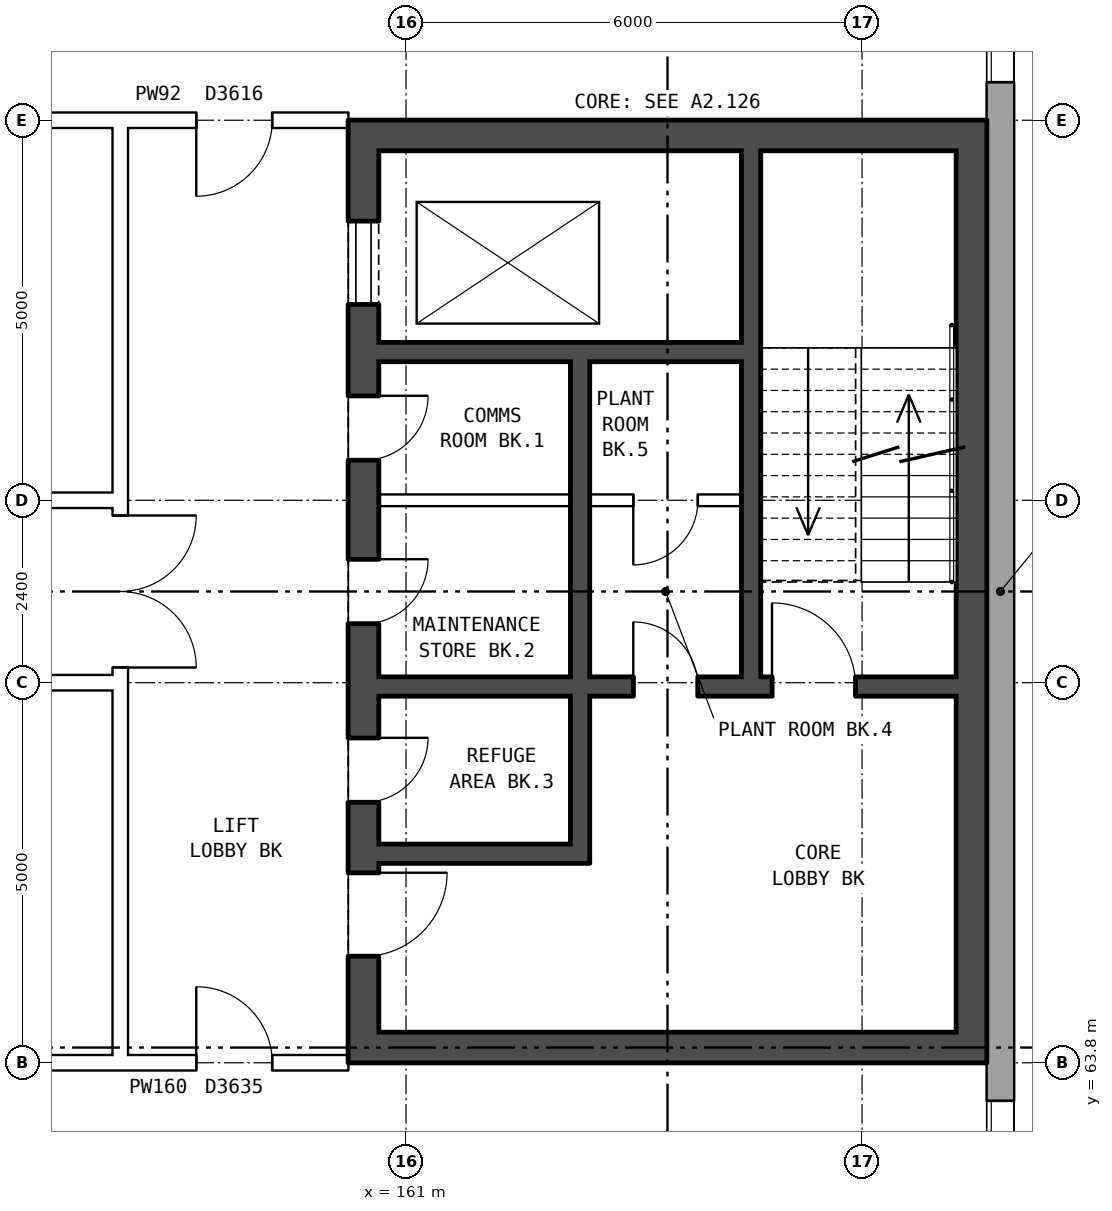
"""IFC4 building model, lengths in metres.
Left out: names, types, materials, properties, quantities, classifications, styles, units other than length and angle.
Written with IfcOpenShell. Run it as: python <this file> out.ifc"""

import sys

from ifc_helpers import new_model, si_unit, direction, frame, frame_2d, origin, place, context, subcontext, project, spatial, rectangle, extrude, element, fill, save


model = new_model("IFC4")
c1 = context("Model", 3, precision=1e-05, world=origin(), true_north=direction((0.0, 1.0)))
c2 = subcontext(c1, "Body", "Model", "MODEL_VIEW")
j1 = project(units=[si_unit("LENGTHUNIT", "METRE"), si_unit("PLANEANGLEUNIT", "RADIAN")], contexts=[c1])
p1 = place(None, origin())
s1 = spatial("IfcSite", under=j1, at=p1, CompositionType="ELEMENT")
p2 = place(p1, origin())
s2 = spatial("IfcBuilding", under=s1, at=p2, CompositionType="ELEMENT")
p3 = place(p2, frame((0.0, 0.0, 198.6)))
s3 = spatial("IfcBuildingStorey", under=s2, at=p3, CompositionType="ELEMENT", Elevation=198.6)
p4 = place(p3, frame((168.82, 57.075, 0.0), z_axis=(0.0, 0.0, 1.0), x_axis=(0.0, 1.0, 0.0)))
e1 = element("IfcWall", 1, at=p4, inside=s3, PredefinedType="STANDARD", context=c2, shape_type="SweptSolid", body=[
    extrude(rectangle(XDim=25.851, YDim=0.36, at=frame_2d((12.925, 0.0))), origin(), (0.0, 0.0, 1.0), 3.7),
])
p5 = place(p4, frame((1.625, 0.0, 1.5)))
e2 = element("IfcOpeningElement", 2, at=p5, cuts=e1, PredefinedType="OPENING", context=c2, shape_type="SweptSolid", body=[
    extrude(rectangle(XDim=1.6, YDim=1.2, at=frame_2d((0.8, 0.6))), frame((0.0, 0.19, 0.0), z_axis=(0.0, -1.0, 0.0), x_axis=(1.0, 0.0, 0.0)), (0.0, 0.0, 1.0), 0.38),
])
p6 = place(p4, frame((4.625, 0.0, 1.5)))
e3 = element("IfcOpeningElement", 3, at=p6, cuts=e1, PredefinedType="OPENING", context=c2, shape_type="SweptSolid", body=[
    extrude(rectangle(XDim=1.6, YDim=1.2, at=frame_2d((0.8, 0.6))), frame((0.0, 0.19, 0.0), z_axis=(0.0, -1.0, 0.0), x_axis=(1.0, 0.0, 0.0)), (0.0, 0.0, 1.0), 0.38),
])
p7 = place(p4, frame((19.625, 0.0, 1.5)))
e4 = element("IfcOpeningElement", 4, at=p7, cuts=e1, PredefinedType="OPENING", context=c2, shape_type="SweptSolid", body=[
    extrude(rectangle(XDim=1.6, YDim=1.2, at=frame_2d((0.8, 0.6))), frame((0.0, 0.19, 0.0), z_axis=(0.0, -1.0, 0.0), x_axis=(1.0, 0.0, 0.0)), (0.0, 0.0, 1.0), 0.38),
])
p8 = place(p4, frame((22.625, 0.0, 1.5)))
e5 = element("IfcOpeningElement", 5, at=p8, cuts=e1, PredefinedType="OPENING", context=c2, shape_type="SweptSolid", body=[
    extrude(rectangle(XDim=1.6, YDim=1.2, at=frame_2d((0.8, 0.6))), frame((0.0, 0.19, 0.0), z_axis=(0.0, -1.0, 0.0), x_axis=(1.0, 0.0, 0.0)), (0.0, 0.0, 1.0), 0.38),
])
p9 = place(p3, frame((160.44, 76.2, 0.0), z_axis=(0.0, 0.0, 1.0), x_axis=(0.0, -1.0, 0.0)))
e6 = element("IfcWall", 6, at=p9, inside=s3, PredefinedType="SHEAR", context=c2, shape_type="SweptSolid", body=[
    extrude(rectangle(XDim=12.4, YDim=0.4, at=frame_2d((6.2, 0.0))), origin(), (0.0, 0.0, 1.0), 3.7),
])
p10 = place(p9, frame((1.325, 0.0, 0.0)))
e7 = element("IfcOpeningElement", 7, at=p10, cuts=e6, PredefinedType="OPENING", context=c2, shape_type="SweptSolid", body=[
    extrude(rectangle(XDim=1.1, YDim=2.1, at=frame_2d((0.55, 1.05))), frame((0.0, 0.21, 0.0), z_axis=(0.0, -1.0, 0.0), x_axis=(1.0, 0.0, 0.0)), (0.0, 0.0, 1.0), 0.42),
])
p11 = place(p9, frame((3.625, 0.0, 0.0)))
e8 = element("IfcOpeningElement", 8, at=p11, cuts=e6, PredefinedType="OPENING", context=c2, shape_type="SweptSolid", body=[
    extrude(rectangle(XDim=0.85, YDim=2.1, at=frame_2d((0.425, 1.05))), frame((0.0, 0.21, 0.0), z_axis=(0.0, -1.0, 0.0), x_axis=(1.0, 0.0, 0.0)), (0.0, 0.0, 1.0), 0.42),
])
p12 = place(p9, frame((5.775, 0.0, 0.0)))
e9 = element("IfcOpeningElement", 9, at=p12, cuts=e6, PredefinedType="OPENING", context=c2, shape_type="SweptSolid", body=[
    extrude(rectangle(XDim=0.85, YDim=2.1, at=frame_2d((0.425, 1.05))), frame((0.0, 0.21, 0.0), z_axis=(0.0, -1.0, 0.0), x_axis=(1.0, 0.0, 0.0)), (0.0, 0.0, 1.0), 0.42),
])
p13 = place(p9, frame((9.9, 0.0, 0.0)))
e10 = element("IfcOpeningElement", 10, at=p13, cuts=e6, PredefinedType="OPENING", context=c2, shape_type="SweptSolid", body=[
    extrude(rectangle(XDim=1.1, YDim=2.1, at=frame_2d((0.55, 1.05))), frame((0.0, 0.21, 0.0), z_axis=(0.0, -1.0, 0.0), x_axis=(1.0, 0.0, 0.0)), (0.0, 0.0, 1.0), 0.42),
])
p14 = place(p9, frame((8.125, 0.0, 0.0)))
e11 = element("IfcOpeningElement", 11, at=p14, cuts=e6, PredefinedType="OPENING", context=c2, shape_type="SweptSolid", body=[
    extrude(rectangle(XDim=0.85, YDim=2.1, at=frame_2d((0.425, 1.05))), frame((0.0, 0.21, 0.0), z_axis=(0.0, -1.0, 0.0), x_axis=(1.0, 0.0, 0.0)), (0.0, 0.0, 1.0), 0.42),
])
p15 = place(p3, frame((168.44, 76.2, 0.0), z_axis=(0.0, 0.0, 1.0), x_axis=(0.0, -1.0, 0.0)))
e12 = element("IfcWall", 12, at=p15, inside=s3, PredefinedType="SHEAR", context=c2, shape_type="SweptSolid", body=[
    extrude(rectangle(XDim=12.4, YDim=0.4, at=frame_2d((6.2, 0.0))), origin(), (0.0, 0.0, 1.0), 3.7),
])
for number, where, z_axis, x_axis in (
    (13, (160.64, 76.0, 0.0), (0.0, 0.0, 1.0), (1.0, 0.0, 0.0)),
    (14, (160.64, 64.0, 0.0), (0.0, 0.0, 1.0), (1.0, 0.0, 0.0)),
):
    element("IfcWall", number, at=place(p3, frame(where, z_axis=z_axis, x_axis=x_axis)), inside=s3, PredefinedType="SHEAR", context=c2, shape_type="SweptSolid", body=[
        extrude(rectangle(XDim=7.6, YDim=0.4, at=frame_2d((3.8, 0.0))), origin(), (0.0, 0.0, 1.0), 3.7),
    ])
p16 = place(p3, frame((160.64, 73.15, 0.0), z_axis=(0.0, 0.0, 1.0), x_axis=(1.0, 0.0, 0.0)))
e15 = element("IfcWall", 15, at=p16, inside=s3, PredefinedType="SHEAR", context=c2, shape_type="SweptSolid", body=[
    extrude(rectangle(XDim=4.775, YDim=0.25, at=frame_2d((2.388, 0.0))), origin(), (0.0, 0.0, 1.0), 3.7),
])
p17 = place(p3, frame((160.64, 71.2, 0.0), z_axis=(0.0, 0.0, 1.0), x_axis=(1.0, 0.0, 0.0)))
e16 = element("IfcWall", 16, at=p17, inside=s3, PredefinedType="PARTITIONING", context=c2, shape_type="SweptSolid", body=[
    extrude(rectangle(XDim=2.525, YDim=0.15, at=frame_2d((1.263, 0.0))), origin(), (0.0, 0.0, 1.0), 3.7),
])
p18 = place(p3, frame((163.415, 71.2, 0.0), z_axis=(0.0, 0.0, 1.0), x_axis=(1.0, 0.0, 0.0)))
e17 = element("IfcWall", 17, at=p18, inside=s3, PredefinedType="PARTITIONING", context=c2, shape_type="SweptSolid", body=[
    extrude(rectangle(XDim=2.0, YDim=0.15, at=frame_2d((1.0, 0.0))), origin(), (0.0, 0.0, 1.0), 3.7),
])
p19 = place(p18, frame((0.575, 0.0, 0.0)))
e18 = element("IfcOpeningElement", 18, at=p19, cuts=e17, PredefinedType="OPENING", context=c2, shape_type="SweptSolid", body=[
    extrude(rectangle(XDim=0.85, YDim=2.1, at=frame_2d((0.425, 1.05))), frame((0.0, 0.085, 0.0), z_axis=(0.0, -1.0, 0.0), x_axis=(1.0, 0.0, 0.0)), (0.0, 0.0, 1.0), 0.17),
])
p20 = place(p3, frame((160.64, 68.75, 0.0), z_axis=(0.0, 0.0, 1.0), x_axis=(1.0, 0.0, 0.0)))
e19 = element("IfcWall", 19, at=p20, inside=s3, PredefinedType="SHEAR", context=c2, shape_type="SweptSolid", body=[
    extrude(rectangle(XDim=7.6, YDim=0.25, at=frame_2d((3.8, 0.0))), origin(), (0.0, 0.0, 1.0), 3.7),
])
p21 = place(p20, frame((5.175, 0.0, 0.0)))
e20 = element("IfcOpeningElement", 20, at=p21, cuts=e19, PredefinedType="OPENING", context=c2, shape_type="SweptSolid", body=[
    extrude(rectangle(XDim=1.1, YDim=2.1, at=frame_2d((0.55, 1.05))), frame((0.0, 0.135, 0.0), z_axis=(0.0, -1.0, 0.0), x_axis=(1.0, 0.0, 0.0)), (0.0, 0.0, 1.0), 0.27),
])
p22 = place(p20, frame((3.35, 0.0, 0.0)))
e21 = element("IfcOpeningElement", 21, at=p22, cuts=e19, PredefinedType="OPENING", context=c2, shape_type="SweptSolid", body=[
    extrude(rectangle(XDim=0.85, YDim=2.1, at=frame_2d((0.425, 1.05))), frame((0.0, 0.135, 0.0), z_axis=(0.0, -1.0, 0.0), x_axis=(1.0, 0.0, 0.0)), (0.0, 0.0, 1.0), 0.27),
])
p23 = place(p3, frame((160.64, 66.55, 0.0), z_axis=(0.0, 0.0, 1.0), x_axis=(1.0, 0.0, 0.0)))
e22 = element("IfcWall", 22, at=p23, inside=s3, PredefinedType="SHEAR", context=c2, shape_type="SweptSolid", body=[
    extrude(rectangle(XDim=2.525, YDim=0.25, at=frame_2d((1.263, 0.0))), origin(), (0.0, 0.0, 1.0), 3.7),
])
p24 = place(p3, frame((163.29, 73.025, 0.0), z_axis=(0.0, 0.0, 1.0), x_axis=(0.0, -1.0, 0.0)))
e23 = element("IfcWall", 23, at=p24, inside=s3, PredefinedType="SHEAR", context=c2, shape_type="SweptSolid", body=[
    extrude(rectangle(XDim=4.15, YDim=0.25, at=frame_2d((2.075, 0.0))), origin(), (0.0, 0.0, 1.0), 3.7),
])
p25 = place(p3, frame((163.29, 68.625, 0.0), z_axis=(0.0, 0.0, 1.0), x_axis=(0.0, -1.0, 0.0)))
e24 = element("IfcWall", 24, at=p25, inside=s3, PredefinedType="SHEAR", context=c2, shape_type="SweptSolid", body=[
    extrude(rectangle(XDim=2.2, YDim=0.25, at=frame_2d((1.1, 0.0))), origin(), (0.0, 0.0, 1.0), 3.7),
])
p26 = place(p3, frame((165.54, 75.8, 0.0), z_axis=(0.0, 0.0, 1.0), x_axis=(0.0, -1.0, 0.0)))
e25 = element("IfcWall", 25, at=p26, inside=s3, PredefinedType="SHEAR", context=c2, shape_type="SweptSolid", body=[
    extrude(rectangle(XDim=6.925, YDim=0.25, at=frame_2d((3.462, 0.0))), origin(), (0.0, 0.0, 1.0), 3.7),
])
p27 = place(p3, frame((157.24, 63.9, 0.0), z_axis=(0.0, 0.0, 1.0), x_axis=(0.0, 1.0, 0.0)))
e26 = element("IfcWall", 26, at=p27, inside=s3, PredefinedType="PARTITIONING", context=c2, shape_type="SweptSolid", body=[
    extrude(rectangle(XDim=12.2, YDim=0.2, at=frame_2d((6.1, 0.0))), origin(), (0.0, 0.0, 1.0), 3.7),
])
p28 = place(p27, frame((5.1, 0.0, 0.0)))
e27 = element("IfcOpeningElement", 27, at=p28, cuts=e26, PredefinedType="OPENING", context=c2, shape_type="SweptSolid", body=[
    extrude(rectangle(XDim=2.0, YDim=2.1, at=frame_2d((1.0, 1.05))), frame((0.0, 0.11, 0.0), z_axis=(0.0, -1.0, 0.0), x_axis=(1.0, 0.0, 0.0)), (0.0, 0.0, 1.0), 0.22),
])
p29 = place(p3, frame((142.76, 63.8, 0.0), z_axis=(0.0, 0.0, 1.0), x_axis=(1.0, 0.0, 0.0)))
e28 = element("IfcWall", 28, at=p29, inside=s3, PredefinedType="PARTITIONING", context=c2, shape_type="SweptSolid", body=[
    extrude(rectangle(XDim=14.48, YDim=0.2, at=frame_2d((7.24, 0.0))), origin(), (0.0, 0.0, 1.0), 3.7),
])
p30 = place(p29, frame((2.12, 0.0, 0.0)))
e29 = element("IfcOpeningElement", 29, at=p30, cuts=e28, PredefinedType="OPENING", context=c2, shape_type="SweptSolid", body=[
    extrude(rectangle(XDim=1.0, YDim=2.1, at=frame_2d((0.5, 1.05))), frame((0.0, 0.11, 0.0), z_axis=(0.0, -1.0, 0.0), x_axis=(1.0, 0.0, 0.0)), (0.0, 0.0, 1.0), 0.22),
])
p31 = place(p29, frame((9.36, 0.0, 0.0)))
e30 = element("IfcOpeningElement", 30, at=p31, cuts=e28, PredefinedType="OPENING", context=c2, shape_type="SweptSolid", body=[
    extrude(rectangle(XDim=1.0, YDim=2.1, at=frame_2d((0.5, 1.05))), frame((0.0, 0.11, 0.0), z_axis=(0.0, -1.0, 0.0), x_axis=(1.0, 0.0, 0.0)), (0.0, 0.0, 1.0), 0.22),
])
p32 = place(p3, frame((157.24, 63.8, 0.0), z_axis=(0.0, 0.0, 1.0), x_axis=(1.0, 0.0, 0.0)))
e31 = element("IfcWall", 31, at=p32, inside=s3, PredefinedType="PARTITIONING", context=c2, shape_type="SweptSolid", body=[
    extrude(rectangle(XDim=3.0, YDim=0.2, at=frame_2d((1.5, 0.0))), origin(), (0.0, 0.0, 1.0), 3.7),
])
p33 = place(p32, frame((1.0, 0.0, 0.0)))
e32 = element("IfcOpeningElement", 32, at=p33, cuts=e31, PredefinedType="OPENING", context=c2, shape_type="SweptSolid", body=[
    extrude(rectangle(XDim=1.0, YDim=2.1, at=frame_2d((0.5, 1.05))), frame((0.0, 0.11, 0.0), z_axis=(0.0, -1.0, 0.0), x_axis=(1.0, 0.0, 0.0)), (0.0, 0.0, 1.0), 0.22),
])
for number, where, z_axis, x_axis in (
    (33, (142.76, 68.8, 0.0), (0.0, 0.0, 1.0), (1.0, 0.0, 0.0)),
    (34, (142.76, 71.2, 0.0), (0.0, 0.0, 1.0), (1.0, 0.0, 0.0)),
):
    element("IfcWall", number, at=place(p3, frame(where, z_axis=z_axis, x_axis=x_axis)), inside=s3, PredefinedType="PARTITIONING", context=c2, shape_type="SweptSolid", body=[
        extrude(rectangle(XDim=14.48, YDim=0.2, at=frame_2d((7.24, 0.0))), origin(), (0.0, 0.0, 1.0), 3.7),
    ])
p34 = place(p3, frame((142.76, 76.2, 0.0), z_axis=(0.0, 0.0, 1.0), x_axis=(1.0, 0.0, 0.0)))
e35 = element("IfcWall", 35, at=p34, inside=s3, PredefinedType="PARTITIONING", context=c2, shape_type="SweptSolid", body=[
    extrude(rectangle(XDim=14.48, YDim=0.2, at=frame_2d((7.24, 0.0))), origin(), (0.0, 0.0, 1.0), 3.7),
])
p35 = place(p34, frame((4.12, 0.0, 0.0)))
e36 = element("IfcOpeningElement", 36, at=p35, cuts=e35, PredefinedType="OPENING", context=c2, shape_type="SweptSolid", body=[
    extrude(rectangle(XDim=1.0, YDim=2.1, at=frame_2d((0.5, 1.05))), frame((0.0, 0.11, 0.0), z_axis=(0.0, -1.0, 0.0), x_axis=(1.0, 0.0, 0.0)), (0.0, 0.0, 1.0), 0.22),
])
p36 = place(p34, frame((11.36, 0.0, 0.0)))
e37 = element("IfcOpeningElement", 37, at=p36, cuts=e35, PredefinedType="OPENING", context=c2, shape_type="SweptSolid", body=[
    extrude(rectangle(XDim=1.0, YDim=2.1, at=frame_2d((0.5, 1.05))), frame((0.0, 0.11, 0.0), z_axis=(0.0, -1.0, 0.0), x_axis=(1.0, 0.0, 0.0)), (0.0, 0.0, 1.0), 0.22),
])
p37 = place(p3, frame((157.24, 76.2, 0.0), z_axis=(0.0, 0.0, 1.0), x_axis=(1.0, 0.0, 0.0)))
e38 = element("IfcWall", 38, at=p37, inside=s3, PredefinedType="PARTITIONING", context=c2, shape_type="SweptSolid", body=[
    extrude(rectangle(XDim=3.0, YDim=0.2, at=frame_2d((1.5, 0.0))), origin(), (0.0, 0.0, 1.0), 3.7),
])
p38 = place(p37, frame((1.0, 0.0, 0.0)))
e39 = element("IfcOpeningElement", 39, at=p38, cuts=e38, PredefinedType="OPENING", context=c2, shape_type="SweptSolid", body=[
    extrude(rectangle(XDim=1.0, YDim=2.1, at=frame_2d((0.5, 1.05))), frame((0.0, 0.11, 0.0), z_axis=(0.0, -1.0, 0.0), x_axis=(1.0, 0.0, 0.0)), (0.0, 0.0, 1.0), 0.22),
])
p39 = place(p6, origin())
e40 = element("IfcWindow", 40, at=p39, inside=s3, PartitioningType="DOUBLE_PANEL_HORIZONTAL", PredefinedType="WINDOW", context=c2, shape_type="SweptSolid", body=[
    extrude(rectangle(XDim=1.6, YDim=1.2, at=frame_2d((0.8, 0.6))), frame((0.0, 0.15, 0.0), z_axis=(0.0, -1.0, 0.0), x_axis=(1.0, 0.0, 0.0)), (0.0, 0.0, 1.0), 0.06),
])
fill(e3, e40)
p40 = place(p7, origin())
e41 = element("IfcWindow", 41, at=p40, inside=s3, PartitioningType="DOUBLE_PANEL_HORIZONTAL", PredefinedType="WINDOW", context=c2, shape_type="SweptSolid", body=[
    extrude(rectangle(XDim=1.6, YDim=1.2, at=frame_2d((0.8, 0.6))), frame((0.0, 0.15, 0.0), z_axis=(0.0, -1.0, 0.0), x_axis=(1.0, 0.0, 0.0)), (0.0, 0.0, 1.0), 0.06),
])
fill(e4, e41)
p41 = place(p10, origin())
e42 = element("IfcDoor", 42, at=p41, inside=s3, OperationType="DOUBLE_DOOR_SLIDING", PredefinedType="DOOR", context=c2, shape_type="SweptSolid", body=[
    extrude(rectangle(XDim=1.1, YDim=2.1, at=frame_2d((0.55, 1.05))), frame((0.0, 0.185, 0.0), z_axis=(0.0, -1.0, 0.0), x_axis=(1.0, 0.0, 0.0)), (0.0, 0.0, 1.0), 0.05),
])
fill(e7, e42)
p42 = place(p11, origin())
e43 = element("IfcDoor", 43, at=p42, inside=s3, OperationType="SINGLE_SWING_LEFT", PredefinedType="DOOR", context=c2, shape_type="SweptSolid", body=[
    extrude(rectangle(XDim=0.85, YDim=2.1, at=frame_2d((0.425, 1.05))), frame((0.0, 0.185, 0.0), z_axis=(0.0, -1.0, 0.0), x_axis=(1.0, 0.0, 0.0)), (0.0, 0.0, 1.0), 0.05),
])
fill(e8, e43)
p43 = place(p12, origin())
e44 = element("IfcDoor", 44, at=p43, inside=s3, OperationType="SINGLE_SWING_LEFT", PredefinedType="DOOR", context=c2, shape_type="SweptSolid", body=[
    extrude(rectangle(XDim=0.85, YDim=2.1, at=frame_2d((0.425, 1.05))), frame((0.0, 0.185, 0.0), z_axis=(0.0, -1.0, 0.0), x_axis=(1.0, 0.0, 0.0)), (0.0, 0.0, 1.0), 0.05),
])
fill(e9, e44)
p44 = place(p13, origin())
e45 = element("IfcDoor", 45, at=p44, inside=s3, OperationType="SINGLE_SWING_LEFT", PredefinedType="DOOR", context=c2, shape_type="SweptSolid", body=[
    extrude(rectangle(XDim=1.1, YDim=2.1, at=frame_2d((0.55, 1.05))), frame((0.0, 0.185, 0.0), z_axis=(0.0, -1.0, 0.0), x_axis=(1.0, 0.0, 0.0)), (0.0, 0.0, 1.0), 0.05),
])
fill(e10, e45)
p45 = place(p21, origin())
e46 = element("IfcDoor", 46, at=p45, inside=s3, OperationType="SINGLE_SWING_LEFT", PredefinedType="DOOR", context=c2, shape_type="SweptSolid", body=[
    extrude(rectangle(XDim=1.1, YDim=2.1, at=frame_2d((0.55, 1.05))), frame((0.0, 0.025, 0.0), z_axis=(0.0, -1.0, 0.0), x_axis=(1.0, 0.0, 0.0)), (0.0, 0.0, 1.0), 0.05),
])
fill(e20, e46)
p46 = place(p14, origin())
e47 = element("IfcDoor", 47, at=p46, inside=s3, OperationType="SINGLE_SWING_LEFT", PredefinedType="DOOR", context=c2, shape_type="SweptSolid", body=[
    extrude(rectangle(XDim=0.85, YDim=2.1, at=frame_2d((0.425, 1.05))), frame((0.0, 0.185, 0.0), z_axis=(0.0, -1.0, 0.0), x_axis=(1.0, 0.0, 0.0)), (0.0, 0.0, 1.0), 0.05),
])
fill(e11, e47)
p47 = place(p22, origin())
e48 = element("IfcDoor", 48, at=p47, inside=s3, OperationType="SINGLE_SWING_LEFT", PredefinedType="DOOR", context=c2, shape_type="SweptSolid", body=[
    extrude(rectangle(XDim=0.85, YDim=2.1, at=frame_2d((0.425, 1.05))), frame((0.0, 0.025, 0.0), z_axis=(0.0, -1.0, 0.0), x_axis=(1.0, 0.0, 0.0)), (0.0, 0.0, 1.0), 0.05),
])
fill(e21, e48)
p48 = place(p19, frame((0.85, 0.0, 0.0), z_axis=(0.0, 0.0, 1.0), x_axis=(-1.0, 0.0, 0.0)))
e49 = element("IfcDoor", 49, at=p48, inside=s3, OperationType="SINGLE_SWING_RIGHT", PredefinedType="DOOR", context=c2, shape_type="SweptSolid", body=[
    extrude(rectangle(XDim=0.85, YDim=2.1, at=frame_2d((0.425, 1.05))), frame((0.0, 0.025, 0.0), z_axis=(0.0, -1.0, 0.0), x_axis=(1.0, 0.0, 0.0)), (0.0, 0.0, 1.0), 0.05),
])
fill(e18, e49)
p49 = place(p28, frame((2.0, 0.0, 0.0), z_axis=(0.0, 0.0, 1.0), x_axis=(-1.0, 0.0, 0.0)))
e50 = element("IfcDoor", 50, at=p49, inside=s3, OperationType="DOUBLE_DOOR_SINGLE_SWING", PredefinedType="DOOR", context=c2, shape_type="SweptSolid", body=[
    extrude(rectangle(XDim=2.0, YDim=2.1, at=frame_2d((1.0, 1.05))), frame((0.0, 0.025, 0.0), z_axis=(0.0, -1.0, 0.0), x_axis=(1.0, 0.0, 0.0)), (0.0, 0.0, 1.0), 0.05),
])
fill(e27, e50)
p50 = place(p33, origin())
e51 = element("IfcDoor", 51, at=p50, inside=s3, OperationType="SINGLE_SWING_LEFT", PredefinedType="DOOR", context=c2, shape_type="SweptSolid", body=[
    extrude(rectangle(XDim=1.0, YDim=2.1, at=frame_2d((0.5, 1.05))), frame((0.0, 0.025, 0.0), z_axis=(0.0, -1.0, 0.0), x_axis=(1.0, 0.0, 0.0)), (0.0, 0.0, 1.0), 0.05),
])
fill(e32, e51)
p51 = place(p38, frame((1.0, 0.0, 0.0), z_axis=(0.0, 0.0, 1.0), x_axis=(-1.0, 0.0, 0.0)))
e52 = element("IfcDoor", 52, at=p51, inside=s3, OperationType="SINGLE_SWING_RIGHT", PredefinedType="DOOR", context=c2, shape_type="SweptSolid", body=[
    extrude(rectangle(XDim=1.0, YDim=2.1, at=frame_2d((0.5, 1.05))), frame((0.0, 0.025, 0.0), z_axis=(0.0, -1.0, 0.0), x_axis=(1.0, 0.0, 0.0)), (0.0, 0.0, 1.0), 0.05),
])
fill(e39, e52)
save(model, sys.argv[1])
